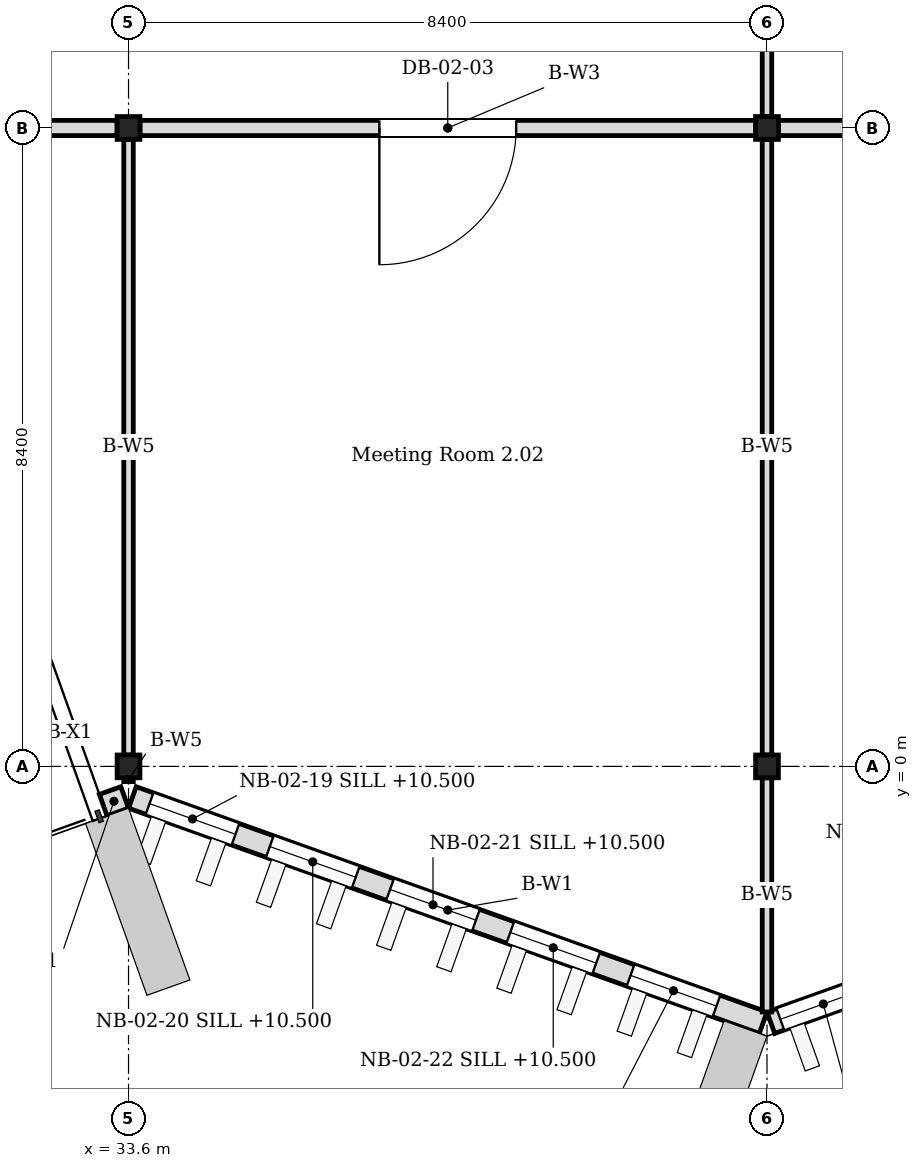
"""IFC4 building model, lengths in metres.
Left out: names, types, materials, properties, quantities, classifications, styles, units other than length and angle.
Written with IfcOpenShell. Run it as: python <this file> out.ifc"""

import sys

from ifc_helpers import new_model, si_unit, direction, frame, frame_2d, origin, origin_2d, place, context, subcontext, project, spatial, rectangle, i_section, extrude, element, fill, save


model = new_model("IFC4")
c1 = context("Model", 3, precision=1e-05, world=origin(), true_north=direction((0.0, 1.0)))
c2 = subcontext(c1, "Body", "Model", "MODEL_VIEW")
j1 = project(units=[si_unit("LENGTHUNIT", "METRE"), si_unit("PLANEANGLEUNIT", "RADIAN")], contexts=[c1])
p1 = place(None, origin())
s1 = spatial("IfcSite", under=j1, at=p1, CompositionType="ELEMENT")
p2 = place(p1, origin())
s2 = spatial("IfcBuilding", under=s1, at=p2, CompositionType="ELEMENT")
p3 = place(p2, frame((0.0, 0.0, 10.2)))
s3 = spatial("IfcBuildingStorey", under=s2, at=p3, CompositionType="ELEMENT", Elevation=10.2)
for number, where, z_axis, x_axis in (
    (1, (33.6, 0.0, 0.0), (0.0, 0.0, 1.0), (1.0, 0.0, 0.0)),
    (2, (33.6, 8.4, 0.0), (0.0, 0.0, 1.0), (1.0, 0.0, 0.0)),
    (3, (42.0, 0.0, 0.0), (0.0, 0.0, 1.0), (1.0, 0.0, 0.0)),
    (4, (42.0, 8.4, 0.0), (0.0, 0.0, 1.0), (1.0, 0.0, 0.0)),
):
    element("IfcColumn", number, at=place(p3, frame(where, z_axis=z_axis, x_axis=x_axis)), inside=s3, PredefinedType="COLUMN", context=c2, shape_type="SweptSolid", body=[
        extrude(i_section(OverallWidth=0.3, OverallDepth=0.3, WebThickness=0.01, FlangeThickness=0.015, FilletRadius=0.013, at=origin_2d()), origin(), (0.0, 0.0, 1.0), 4.2),
    ])
p4 = place(p3, frame((33.267, -0.51, 0.0), z_axis=(0.0, 0.0, 1.0), x_axis=(0.941797147708, 0.336181695768, 0.0)))
e5 = element("IfcWall", 5, at=p4, inside=s3, PredefinedType="SOLIDWALL", context=c2, shape_type="SweptSolid", body=[
    extrude(rectangle(XDim=0.3, YDim=0.3, at=frame_2d((0.15, 0.0))), origin(), (0.0, 0.0, 1.0), 4.05),
])
p5 = place(p3, frame((33.65, -0.409, 0.0), z_axis=(0.0, 0.0, 1.0), x_axis=(0.941736270411, -0.336352191894, 0.0)))
e6 = element("IfcWall", 6, at=p5, inside=s3, PredefinedType="SOLIDWALL", context=c2, shape_type="SweptSolid", body=[
    extrude(rectangle(XDim=8.812, YDim=0.3, at=frame_2d((4.406, 0.0))), origin(), (0.0, 0.0, 1.0), 4.05),
])
p6 = place(p5, frame((0.24, 0.0, 0.3)))
e7 = element("IfcOpeningElement", 7, at=p6, cuts=e6, PredefinedType="OPENING", context=c2, shape_type="SweptSolid", body=[
    extrude(rectangle(XDim=1.2, YDim=3.3, at=frame_2d((0.6, 1.65))), frame((0.0, 0.16, 0.0), z_axis=(0.0, -1.0, 0.0), x_axis=(1.0, 0.0, 0.0)), (0.0, 0.0, 1.0), 0.32),
])
p7 = place(p5, frame((1.92, 0.0, 0.3)))
e8 = element("IfcOpeningElement", 8, at=p7, cuts=e6, PredefinedType="OPENING", context=c2, shape_type="SweptSolid", body=[
    extrude(rectangle(XDim=1.2, YDim=3.3, at=frame_2d((0.6, 1.65))), frame((0.0, 0.16, 0.0), z_axis=(0.0, -1.0, 0.0), x_axis=(1.0, 0.0, 0.0)), (0.0, 0.0, 1.0), 0.32),
])
p8 = place(p5, frame((3.6, 0.0, 0.3)))
e9 = element("IfcOpeningElement", 9, at=p8, cuts=e6, PredefinedType="OPENING", context=c2, shape_type="SweptSolid", body=[
    extrude(rectangle(XDim=1.2, YDim=3.3, at=frame_2d((0.6, 1.65))), frame((0.0, 0.16, 0.0), z_axis=(0.0, -1.0, 0.0), x_axis=(1.0, 0.0, 0.0)), (0.0, 0.0, 1.0), 0.32),
])
p9 = place(p5, frame((5.28, 0.0, 0.3)))
e10 = element("IfcOpeningElement", 10, at=p9, cuts=e6, PredefinedType="OPENING", context=c2, shape_type="SweptSolid", body=[
    extrude(rectangle(XDim=1.2, YDim=3.3, at=frame_2d((0.6, 1.65))), frame((0.0, 0.16, 0.0), z_axis=(0.0, -1.0, 0.0), x_axis=(1.0, 0.0, 0.0)), (0.0, 0.0, 1.0), 0.32),
])
p10 = place(p5, frame((6.96, 0.0, 0.3)))
e11 = element("IfcOpeningElement", 11, at=p10, cuts=e6, PredefinedType="OPENING", context=c2, shape_type="SweptSolid", body=[
    extrude(rectangle(XDim=1.2, YDim=3.3, at=frame_2d((0.6, 1.65))), frame((0.0, 0.16, 0.0), z_axis=(0.0, -1.0, 0.0), x_axis=(1.0, 0.0, 0.0)), (0.0, 0.0, 1.0), 0.32),
])
p11 = place(p3, frame((42.051, -3.373, 0.0), z_axis=(0.0, 0.0, 1.0), x_axis=(0.941736270411, 0.336352191894, 0.0)))
e12 = element("IfcWall", 12, at=p11, inside=s3, PredefinedType="SOLIDWALL", context=c2, shape_type="SweptSolid", body=[
    extrude(rectangle(XDim=8.812, YDim=0.3, at=frame_2d((4.406, 0.0))), origin(), (0.0, 0.0, 1.0), 4.05),
])
p12 = place(p11, frame((0.133, 0.0, 0.3)))
e13 = element("IfcOpeningElement", 13, at=p12, cuts=e12, PredefinedType="OPENING", context=c2, shape_type="SweptSolid", body=[
    extrude(rectangle(XDim=1.2, YDim=3.3, at=frame_2d((0.6, 1.65))), frame((0.0, 0.16, 0.0), z_axis=(0.0, -1.0, 0.0), x_axis=(1.0, 0.0, 0.0)), (0.0, 0.0, 1.0), 0.32),
])
p13 = place(p11, frame((1.813, 0.0, 0.3)))
e14 = element("IfcOpeningElement", 14, at=p13, cuts=e12, PredefinedType="OPENING", context=c2, shape_type="SweptSolid", body=[
    extrude(rectangle(XDim=1.2, YDim=3.3, at=frame_2d((0.6, 1.65))), frame((0.0, 0.16, 0.0), z_axis=(0.0, -1.0, 0.0), x_axis=(1.0, 0.0, 0.0)), (0.0, 0.0, 1.0), 0.32),
])
p14 = place(p11, frame((3.493, 0.0, 0.3)))
e15 = element("IfcOpeningElement", 15, at=p14, cuts=e12, PredefinedType="OPENING", context=c2, shape_type="SweptSolid", body=[
    extrude(rectangle(XDim=1.2, YDim=3.3, at=frame_2d((0.6, 1.65))), frame((0.0, 0.16, 0.0), z_axis=(0.0, -1.0, 0.0), x_axis=(1.0, 0.0, 0.0)), (0.0, 0.0, 1.0), 0.32),
])
p15 = place(p11, frame((5.173, 0.0, 0.3)))
e16 = element("IfcOpeningElement", 16, at=p15, cuts=e12, PredefinedType="OPENING", context=c2, shape_type="SweptSolid", body=[
    extrude(rectangle(XDim=1.2, YDim=3.3, at=frame_2d((0.6, 1.65))), frame((0.0, 0.16, 0.0), z_axis=(0.0, -1.0, 0.0), x_axis=(1.0, 0.0, 0.0)), (0.0, 0.0, 1.0), 0.32),
])
p16 = place(p11, frame((6.853, 0.0, 0.3)))
e17 = element("IfcOpeningElement", 17, at=p16, cuts=e12, PredefinedType="OPENING", context=c2, shape_type="SweptSolid", body=[
    extrude(rectangle(XDim=1.2, YDim=3.3, at=frame_2d((0.6, 1.65))), frame((0.0, 0.16, 0.0), z_axis=(0.0, -1.0, 0.0), x_axis=(1.0, 0.0, 0.0)), (0.0, 0.0, 1.0), 0.32),
])
p17 = place(p3, frame((25.35, 8.4, 0.0), z_axis=(0.0, 0.0, 1.0), x_axis=(1.0, 0.0, 0.0)))
e18 = element("IfcWall", 18, at=p17, inside=s3, PredefinedType="PARTITIONING", context=c2, shape_type="SweptSolid", body=[
    extrude(rectangle(XDim=8.1, YDim=0.2, at=frame_2d((4.05, 0.0))), origin(), (0.0, 0.0, 1.0), 3.35),
])
p18 = place(p17, frame((2.85, 0.0, 0.0)))
e19 = element("IfcOpeningElement", 19, at=p18, cuts=e18, PredefinedType="OPENING", context=c2, shape_type="SweptSolid", body=[
    extrude(rectangle(XDim=2.4, YDim=2.2, at=frame_2d((1.2, 1.1))), frame((0.0, 0.11, 0.0), z_axis=(0.0, -1.0, 0.0), x_axis=(1.0, 0.0, 0.0)), (0.0, 0.0, 1.0), 0.22),
])
p19 = place(p3, frame((33.75, 8.4, 0.0), z_axis=(0.0, 0.0, 1.0), x_axis=(1.0, 0.0, 0.0)))
e20 = element("IfcWall", 20, at=p19, inside=s3, PredefinedType="PARTITIONING", context=c2, shape_type="SweptSolid", body=[
    extrude(rectangle(XDim=8.1, YDim=0.2, at=frame_2d((4.05, 0.0))), origin(), (0.0, 0.0, 1.0), 3.35),
])
p20 = place(p19, frame((3.15, 0.0, 0.0)))
e21 = element("IfcOpeningElement", 21, at=p20, cuts=e20, PredefinedType="OPENING", context=c2, shape_type="SweptSolid", body=[
    extrude(rectangle(XDim=1.8, YDim=2.1, at=frame_2d((0.9, 1.05))), frame((0.0, 0.11, 0.0), z_axis=(0.0, -1.0, 0.0), x_axis=(1.0, 0.0, 0.0)), (0.0, 0.0, 1.0), 0.22),
])
p21 = place(p3, frame((42.15, 8.4, 0.0), z_axis=(0.0, 0.0, 1.0), x_axis=(1.0, 0.0, 0.0)))
e22 = element("IfcWall", 22, at=p21, inside=s3, PredefinedType="PARTITIONING", context=c2, shape_type="SweptSolid", body=[
    extrude(rectangle(XDim=8.1, YDim=0.2, at=frame_2d((4.05, 0.0))), origin(), (0.0, 0.0, 1.0), 3.35),
])
p22 = place(p21, frame((2.85, 0.0, 0.0)))
e23 = element("IfcOpeningElement", 23, at=p22, cuts=e22, PredefinedType="OPENING", context=c2, shape_type="SweptSolid", body=[
    extrude(rectangle(XDim=2.4, YDim=2.2, at=frame_2d((1.2, 1.1))), frame((0.0, 0.11, 0.0), z_axis=(0.0, -1.0, 0.0), x_axis=(1.0, 0.0, 0.0)), (0.0, 0.0, 1.0), 0.22),
])
p23 = place(p3, frame((33.6, -0.2, 0.0), z_axis=(0.0, 0.0, 1.0), x_axis=(0.0, 1.0, 0.0)))
e24 = element("IfcWall", 24, at=p23, inside=s3, PredefinedType="MOVABLE", context=c2, shape_type="SweptSolid", body=[
    extrude(rectangle(XDim=0.05, YDim=0.125, at=frame_2d((0.025, 0.0))), origin(), (0.0, 0.0, 1.0), 3.35),
])
p24 = place(p3, frame((33.6, 0.15, 0.0), z_axis=(0.0, 0.0, 1.0), x_axis=(0.0, 1.0, 0.0)))
e25 = element("IfcWall", 25, at=p24, inside=s3, PredefinedType="MOVABLE", context=c2, shape_type="SweptSolid", body=[
    extrude(rectangle(XDim=8.1, YDim=0.125, at=frame_2d((4.05, 0.0))), origin(), (0.0, 0.0, 1.0), 3.35),
])
p25 = place(p3, frame((42.0, -3.231, 0.0), z_axis=(0.0, 0.0, 1.0), x_axis=(0.0, 1.0, 0.0)))
e26 = element("IfcWall", 26, at=p25, inside=s3, PredefinedType="MOVABLE", context=c2, shape_type="SweptSolid", body=[
    extrude(rectangle(XDim=3.082, YDim=0.125, at=frame_2d((1.541, 0.0))), origin(), (0.0, 0.0, 1.0), 3.35),
])
p26 = place(p3, frame((42.0, 0.15, 0.0), z_axis=(0.0, 0.0, 1.0), x_axis=(0.0, 1.0, 0.0)))
e27 = element("IfcWall", 27, at=p26, inside=s3, PredefinedType="MOVABLE", context=c2, shape_type="SweptSolid", body=[
    extrude(rectangle(XDim=8.1, YDim=0.125, at=frame_2d((4.05, 0.0))), origin(), (0.0, 0.0, 1.0), 3.35),
])
p27 = place(p3, frame((42.0, 8.55, 0.0), z_axis=(0.0, 0.0, 1.0), x_axis=(0.0, 1.0, 0.0)))
e28 = element("IfcWall", 28, at=p27, inside=s3, PredefinedType="PARTITIONING", context=c2, shape_type="SweptSolid", body=[
    extrude(rectangle(XDim=8.1, YDim=0.125, at=frame_2d((4.05, 0.0))), origin(), (0.0, 0.0, 1.0), 3.35),
])
p28 = place(p27, frame((2.85, 0.0, 0.0)))
e29 = element("IfcOpeningElement", 29, at=p28, cuts=e28, PredefinedType="OPENING", context=c2, shape_type="SweptSolid", body=[
    extrude(rectangle(XDim=2.4, YDim=2.2, at=frame_2d((1.2, 1.1))), frame((0.0, 0.073, 0.0), z_axis=(0.0, -1.0, 0.0), x_axis=(1.0, 0.0, 0.0)), (0.0, 0.0, 1.0), 0.145),
])
p29 = place(p6, origin())
e30 = element("IfcWindow", 30, at=p29, inside=s3, PartitioningType="TRIPLE_PANEL_VERTICAL", PredefinedType="WINDOW", context=c2, shape_type="SweptSolid", body=[
    extrude(rectangle(XDim=1.2, YDim=3.3, at=frame_2d((0.6, 1.65))), frame((0.0, 0.03, 0.0), z_axis=(0.0, -1.0, 0.0), x_axis=(1.0, 0.0, 0.0)), (0.0, 0.0, 1.0), 0.06),
])
fill(e7, e30)
p30 = place(p7, origin())
e31 = element("IfcWindow", 31, at=p30, inside=s3, PartitioningType="TRIPLE_PANEL_VERTICAL", PredefinedType="WINDOW", context=c2, shape_type="SweptSolid", body=[
    extrude(rectangle(XDim=1.2, YDim=3.3, at=frame_2d((0.6, 1.65))), frame((0.0, 0.03, 0.0), z_axis=(0.0, -1.0, 0.0), x_axis=(1.0, 0.0, 0.0)), (0.0, 0.0, 1.0), 0.06),
])
fill(e8, e31)
p31 = place(p8, origin())
e32 = element("IfcWindow", 32, at=p31, inside=s3, PartitioningType="TRIPLE_PANEL_VERTICAL", PredefinedType="WINDOW", context=c2, shape_type="SweptSolid", body=[
    extrude(rectangle(XDim=1.2, YDim=3.3, at=frame_2d((0.6, 1.65))), frame((0.0, 0.03, 0.0), z_axis=(0.0, -1.0, 0.0), x_axis=(1.0, 0.0, 0.0)), (0.0, 0.0, 1.0), 0.06),
])
fill(e9, e32)
p32 = place(p9, origin())
e33 = element("IfcWindow", 33, at=p32, inside=s3, PartitioningType="TRIPLE_PANEL_VERTICAL", PredefinedType="WINDOW", context=c2, shape_type="SweptSolid", body=[
    extrude(rectangle(XDim=1.2, YDim=3.3, at=frame_2d((0.6, 1.65))), frame((0.0, 0.03, 0.0), z_axis=(0.0, -1.0, 0.0), x_axis=(1.0, 0.0, 0.0)), (0.0, 0.0, 1.0), 0.06),
])
fill(e10, e33)
p33 = place(p10, origin())
e34 = element("IfcWindow", 34, at=p33, inside=s3, PartitioningType="TRIPLE_PANEL_VERTICAL", PredefinedType="WINDOW", context=c2, shape_type="SweptSolid", body=[
    extrude(rectangle(XDim=1.2, YDim=3.3, at=frame_2d((0.6, 1.65))), frame((0.0, 0.03, 0.0), z_axis=(0.0, -1.0, 0.0), x_axis=(1.0, 0.0, 0.0)), (0.0, 0.0, 1.0), 0.06),
])
fill(e11, e34)
p34 = place(p12, origin())
e35 = element("IfcWindow", 35, at=p34, inside=s3, PartitioningType="TRIPLE_PANEL_VERTICAL", PredefinedType="WINDOW", context=c2, shape_type="SweptSolid", body=[
    extrude(rectangle(XDim=1.2, YDim=3.3, at=frame_2d((0.6, 1.65))), frame((0.0, 0.03, 0.0), z_axis=(0.0, -1.0, 0.0), x_axis=(1.0, 0.0, 0.0)), (0.0, 0.0, 1.0), 0.06),
])
fill(e13, e35)
p35 = place(p20, origin())
e36 = element("IfcDoor", 36, at=p35, inside=s3, OperationType="DOUBLE_DOOR_SINGLE_SWING", PredefinedType="DOOR", context=c2, shape_type="SweptSolid", body=[
    extrude(rectangle(XDim=1.8, YDim=2.1, at=frame_2d((0.9, 1.05))), frame((0.0, 0.025, 0.0), z_axis=(0.0, -1.0, 0.0), x_axis=(1.0, 0.0, 0.0)), (0.0, 0.0, 1.0), 0.05),
])
fill(e21, e36)
save(model, sys.argv[1])
